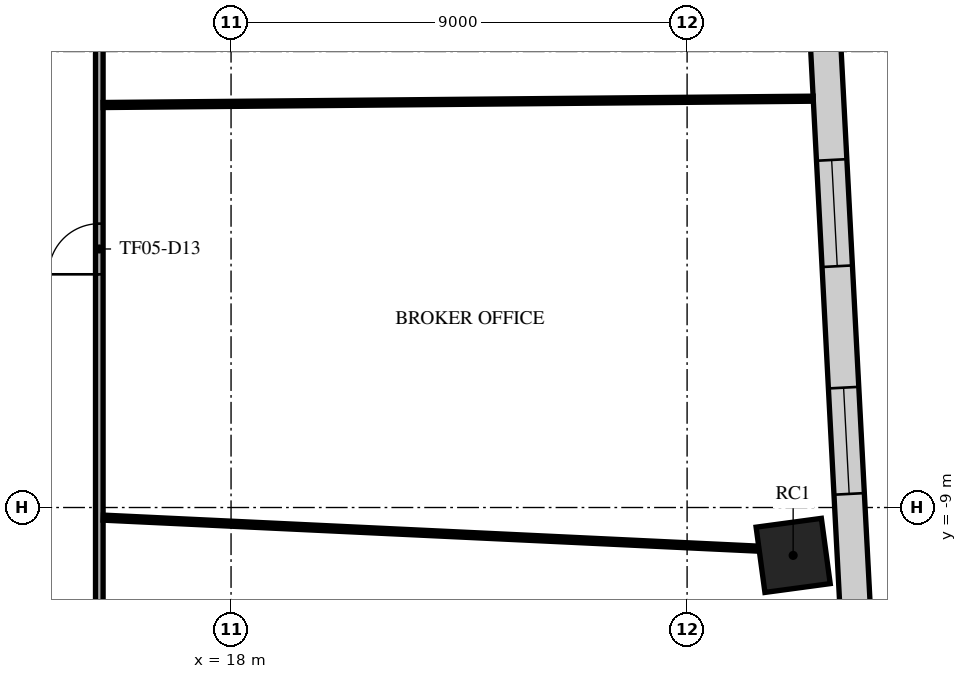
"""IFC4 building model, lengths in metres.
Left out: names, types, materials, properties, quantities, classifications, styles, units other than length and angle.
Written with IfcOpenShell. Run it as: python <this file> out.ifc"""

import sys

from ifc_helpers import new_model, si_unit, direction, frame, frame_2d, origin, origin_2d, place, context, subcontext, project, spatial, rectangle, extrude, element, fill, save


model = new_model("IFC4")
c1 = context("Model", 3, precision=1e-05, world=origin(), true_north=direction((0.0, 1.0)))
c2 = subcontext(c1, "Body", "Model", "MODEL_VIEW")
j1 = project(units=[si_unit("LENGTHUNIT", "METRE"), si_unit("PLANEANGLEUNIT", "RADIAN")], contexts=[c1])
p1 = place(None, origin())
s1 = spatial("IfcSite", under=j1, at=p1, CompositionType="ELEMENT")
p2 = place(p1, origin())
s2 = spatial("IfcBuilding", under=s1, at=p2, CompositionType="ELEMENT")
p3 = place(p2, frame((0.0, 0.0, 27.3)))
s3 = spatial("IfcBuildingStorey", under=s2, at=p3, CompositionType="ELEMENT", Elevation=27.3)
p4 = place(p3, frame((29.093, -9.945, 0.0), z_axis=(0.0, 0.0, 1.0), x_axis=(0.991001197216, 0.133853005627, 0.0)))
e1 = element("IfcColumn", 1, at=p4, inside=s3, PredefinedType="COLUMN", context=c2, shape_type="SweptSolid", body=[
    extrude(rectangle(XDim=1.3, YDim=1.3, at=origin_2d()), origin(), (0.0, 0.0, 1.0), 4.8),
])
p5 = place(p3, frame((30.961, -23.287, 0.0), z_axis=(0.0, 0.0, 1.0), x_axis=(-0.052333049168, 0.998629687104, 0.0)))
e2 = element("IfcWall", 2, at=p5, inside=s3, PredefinedType="STANDARD", context=c2, shape_type="SweptSolid", body=[
    extrude(rectangle(XDim=49.376, YDim=0.6, at=frame_2d((24.688, 0.0))), origin(), (0.0, 0.0, 1.0), 4.35),
])
p6 = place(p5, frame((1.138, 0.0, 0.9)))
e3 = element("IfcOpeningElement", 3, at=p6, cuts=e2, PredefinedType="OPENING", context=c2, shape_type="SweptSolid", body=[
    extrude(rectangle(XDim=2.1, YDim=2.7, at=frame_2d((1.05, 1.35))), frame((0.0, 0.31, 0.0), z_axis=(0.0, -1.0, 0.0), x_axis=(1.0, 0.0, 0.0)), (0.0, 0.0, 1.0), 0.62),
])
p7 = place(p5, frame((5.576, 0.0, 0.9)))
e4 = element("IfcOpeningElement", 4, at=p7, cuts=e2, PredefinedType="OPENING", context=c2, shape_type="SweptSolid", body=[
    extrude(rectangle(XDim=2.1, YDim=2.7, at=frame_2d((1.05, 1.35))), frame((0.0, 0.31, 0.0), z_axis=(0.0, -1.0, 0.0), x_axis=(1.0, 0.0, 0.0)), (0.0, 0.0, 1.0), 0.62),
])
p8 = place(p5, frame((10.076, 0.0, 0.9)))
e5 = element("IfcOpeningElement", 5, at=p8, cuts=e2, PredefinedType="OPENING", context=c2, shape_type="SweptSolid", body=[
    extrude(rectangle(XDim=2.1, YDim=2.7, at=frame_2d((1.05, 1.35))), frame((0.0, 0.31, 0.0), z_axis=(0.0, -1.0, 0.0), x_axis=(1.0, 0.0, 0.0)), (0.0, 0.0, 1.0), 0.62),
])
p9 = place(p5, frame((14.576, 0.0, 0.9)))
e6 = element("IfcOpeningElement", 6, at=p9, cuts=e2, PredefinedType="OPENING", context=c2, shape_type="SweptSolid", body=[
    extrude(rectangle(XDim=2.1, YDim=2.7, at=frame_2d((1.05, 1.35))), frame((0.0, 0.31, 0.0), z_axis=(0.0, -1.0, 0.0), x_axis=(1.0, 0.0, 0.0)), (0.0, 0.0, 1.0), 0.62),
])
p10 = place(p5, frame((19.076, 0.0, 0.9)))
e7 = element("IfcOpeningElement", 7, at=p10, cuts=e2, PredefinedType="OPENING", context=c2, shape_type="SweptSolid", body=[
    extrude(rectangle(XDim=2.1, YDim=2.7, at=frame_2d((1.05, 1.35))), frame((0.0, 0.31, 0.0), z_axis=(0.0, -1.0, 0.0), x_axis=(1.0, 0.0, 0.0)), (0.0, 0.0, 1.0), 0.62),
])
p11 = place(p5, frame((23.576, 0.0, 0.9)))
e8 = element("IfcOpeningElement", 8, at=p11, cuts=e2, PredefinedType="OPENING", context=c2, shape_type="SweptSolid", body=[
    extrude(rectangle(XDim=2.1, YDim=2.7, at=frame_2d((1.05, 1.35))), frame((0.0, 0.31, 0.0), z_axis=(0.0, -1.0, 0.0), x_axis=(1.0, 0.0, 0.0)), (0.0, 0.0, 1.0), 0.62),
])
p12 = place(p5, frame((28.076, 0.0, 0.9)))
e9 = element("IfcOpeningElement", 9, at=p12, cuts=e2, PredefinedType="OPENING", context=c2, shape_type="SweptSolid", body=[
    extrude(rectangle(XDim=2.1, YDim=2.7, at=frame_2d((1.05, 1.35))), frame((0.0, 0.31, 0.0), z_axis=(0.0, -1.0, 0.0), x_axis=(1.0, 0.0, 0.0)), (0.0, 0.0, 1.0), 0.62),
])
p13 = place(p5, frame((32.576, 0.0, 0.9)))
e10 = element("IfcOpeningElement", 10, at=p13, cuts=e2, PredefinedType="OPENING", context=c2, shape_type="SweptSolid", body=[
    extrude(rectangle(XDim=2.1, YDim=2.7, at=frame_2d((1.05, 1.35))), frame((0.0, 0.31, 0.0), z_axis=(0.0, -1.0, 0.0), x_axis=(1.0, 0.0, 0.0)), (0.0, 0.0, 1.0), 0.62),
])
p14 = place(p5, frame((37.076, 0.0, 0.9)))
e11 = element("IfcOpeningElement", 11, at=p14, cuts=e2, PredefinedType="OPENING", context=c2, shape_type="SweptSolid", body=[
    extrude(rectangle(XDim=2.1, YDim=2.7, at=frame_2d((1.05, 1.35))), frame((0.0, 0.31, 0.0), z_axis=(0.0, -1.0, 0.0), x_axis=(1.0, 0.0, 0.0)), (0.0, 0.0, 1.0), 0.62),
])
p15 = place(p5, frame((41.576, 0.0, 0.9)))
e12 = element("IfcOpeningElement", 12, at=p15, cuts=e2, PredefinedType="OPENING", context=c2, shape_type="SweptSolid", body=[
    extrude(rectangle(XDim=2.1, YDim=2.7, at=frame_2d((1.05, 1.35))), frame((0.0, 0.31, 0.0), z_axis=(0.0, -1.0, 0.0), x_axis=(1.0, 0.0, 0.0)), (0.0, 0.0, 1.0), 0.62),
])
p16 = place(p5, frame((46.076, 0.0, 0.9)))
e13 = element("IfcOpeningElement", 13, at=p16, cuts=e2, PredefinedType="OPENING", context=c2, shape_type="SweptSolid", body=[
    extrude(rectangle(XDim=2.1, YDim=2.7, at=frame_2d((1.05, 1.35))), frame((0.0, 0.31, 0.0), z_axis=(0.0, -1.0, 0.0), x_axis=(1.0, 0.0, 0.0)), (0.0, 0.0, 1.0), 0.62),
])
p17 = place(p3, frame((15.4, -15.325, 0.0), z_axis=(0.0, 0.0, 1.0), x_axis=(0.0, 1.0, 0.0)))
e14 = element("IfcWall", 14, at=p17, inside=s3, PredefinedType="PARTITIONING", context=c2, shape_type="SweptSolid", body=[
    extrude(rectangle(XDim=30.65, YDim=0.15, at=frame_2d((15.325, 0.0))), origin(), (0.0, 0.0, 1.0), 3.85),
])
p18 = place(p17, frame((25.068, 0.0, 0.0)))
e15 = element("IfcOpeningElement", 15, at=p18, cuts=e14, PredefinedType="OPENING", context=c2, shape_type="SweptSolid", body=[
    extrude(rectangle(XDim=1.8, YDim=2.1, at=frame_2d((0.9, 1.05))), frame((0.0, 0.085, 0.0), z_axis=(0.0, -1.0, 0.0), x_axis=(1.0, 0.0, 0.0)), (0.0, 0.0, 1.0), 0.17),
])
p19 = place(p17, frame((10.927, 0.0, 0.0)))
e16 = element("IfcOpeningElement", 16, at=p19, cuts=e14, PredefinedType="OPENING", context=c2, shape_type="SweptSolid", body=[
    extrude(rectangle(XDim=1.0, YDim=2.1, at=frame_2d((0.5, 1.05))), frame((0.0, 0.085, 0.0), z_axis=(0.0, -1.0, 0.0), x_axis=(1.0, 0.0, 0.0)), (0.0, 0.0, 1.0), 0.17),
])
p20 = place(p3, frame((15.477, -9.2, 0.0), z_axis=(0.0, 0.0, 1.0), x_axis=(0.998880891155, -0.04729656738, 0.0)))
e17 = element("IfcWall", 17, at=p20, inside=s3, PredefinedType="PARTITIONING", context=c2, shape_type="SweptSolid", body=[
    extrude(rectangle(XDim=12.956, YDim=0.1, at=frame_2d((6.478, 0.0))), origin(), (0.0, 0.0, 1.0), 3.85),
])
p21 = place(p3, frame((15.475, -1.056, 0.0), z_axis=(0.0, 0.0, 1.0), x_axis=(0.999960210713, 0.00892059359, 0.0)))
e18 = element("IfcWall", 18, at=p21, inside=s3, PredefinedType="PARTITIONING", context=c2, shape_type="SweptSolid", body=[
    extrude(rectangle(XDim=14.012, YDim=0.1, at=frame_2d((7.006, 0.0))), origin(), (0.0, 0.0, 1.0), 3.55),
])
p22 = place(p9, origin())
e19 = element("IfcWindow", 19, at=p22, inside=s3, PartitioningType="SINGLE_PANEL", PredefinedType="WINDOW", context=c2, shape_type="SweptSolid", body=[
    extrude(rectangle(XDim=2.1, YDim=2.7, at=frame_2d((1.05, 1.35))), frame((0.0, 0.03, 0.0), z_axis=(0.0, -1.0, 0.0), x_axis=(1.0, 0.0, 0.0)), (0.0, 0.0, 1.0), 0.06),
])
fill(e6, e19)
p23 = place(p10, origin())
e20 = element("IfcWindow", 20, at=p23, inside=s3, PartitioningType="SINGLE_PANEL", PredefinedType="WINDOW", context=c2, shape_type="SweptSolid", body=[
    extrude(rectangle(XDim=2.1, YDim=2.7, at=frame_2d((1.05, 1.35))), frame((0.0, 0.03, 0.0), z_axis=(0.0, -1.0, 0.0), x_axis=(1.0, 0.0, 0.0)), (0.0, 0.0, 1.0), 0.06),
])
fill(e7, e20)
p24 = place(p19, frame((1.0, 0.0, 0.0), z_axis=(0.0, 0.0, 1.0), x_axis=(-1.0, 0.0, 0.0)))
e21 = element("IfcDoor", 21, at=p24, inside=s3, OperationType="SINGLE_SWING_RIGHT", PredefinedType="DOOR", context=c2, shape_type="SweptSolid", body=[
    extrude(rectangle(XDim=1.0, YDim=2.1, at=frame_2d((0.5, 1.05))), frame((0.0, 0.025, 0.0), z_axis=(0.0, -1.0, 0.0), x_axis=(1.0, 0.0, 0.0)), (0.0, 0.0, 1.0), 0.05),
])
fill(e16, e21)
save(model, sys.argv[1])
